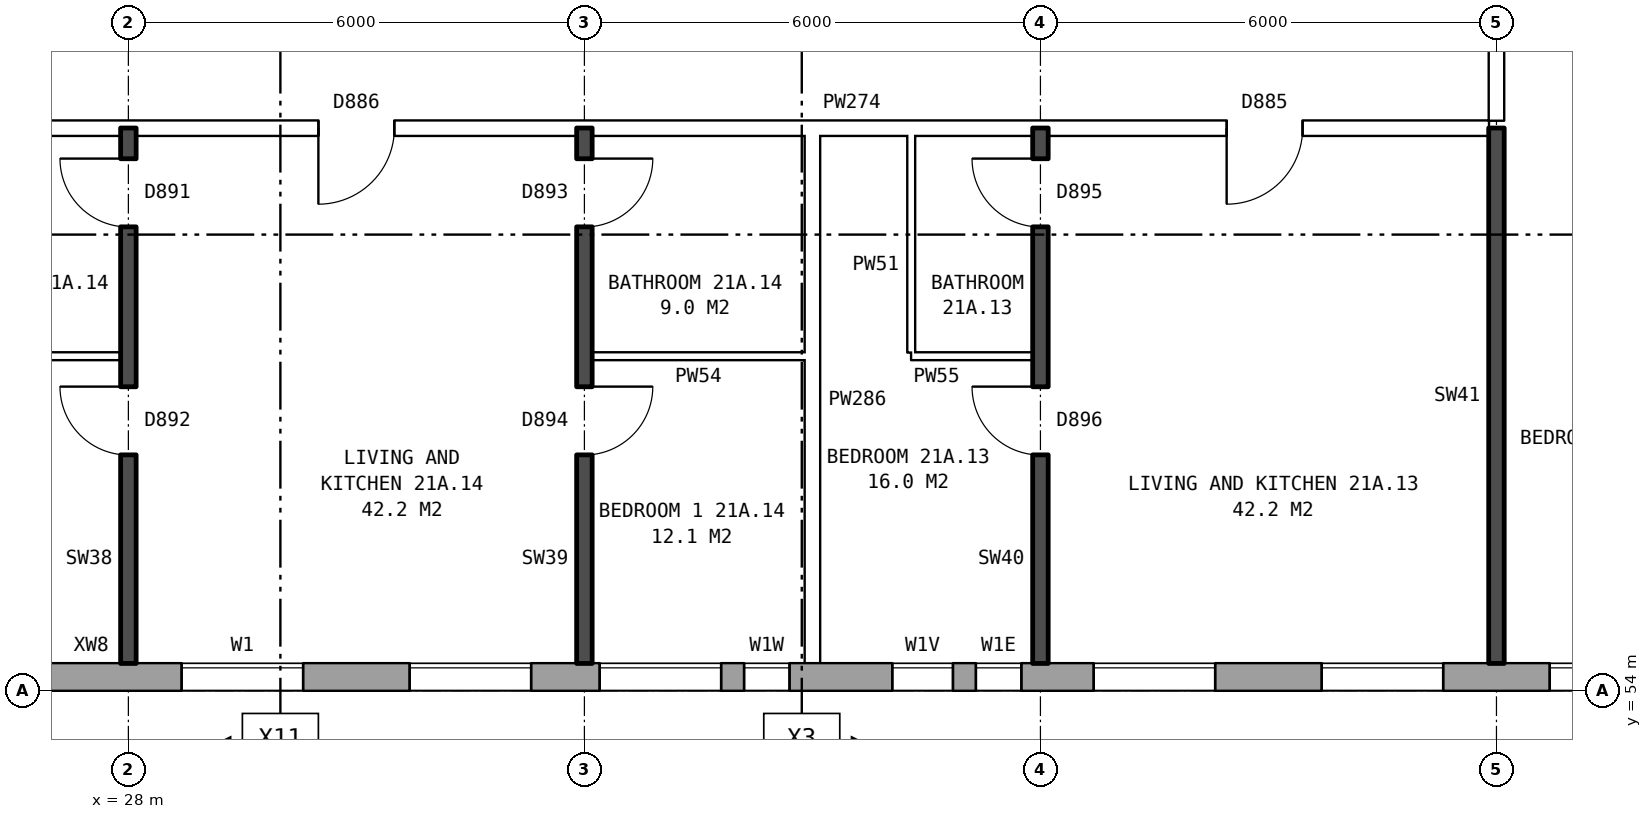
"""IFC4 building model, lengths in metres.
Left out: names, types, materials, properties, quantities, classifications, styles, units other than length and angle.
Written with IfcOpenShell. Run it as: python <this file> out.ifc"""

import sys

from ifc_helpers import new_model, si_unit, direction, frame, frame_2d, origin, place, context, subcontext, project, spatial, rectangle, extrude, element, fill, save


model = new_model("IFC4")
c1 = context("Model", 3, precision=1e-05, world=origin(), true_north=direction((0.0, 1.0)))
c2 = subcontext(c1, "Body", "Model", "MODEL_VIEW")
j1 = project(units=[si_unit("LENGTHUNIT", "METRE"), si_unit("PLANEANGLEUNIT", "RADIAN")], contexts=[c1])
p1 = place(None, origin())
s1 = spatial("IfcSite", under=j1, at=p1, CompositionType="ELEMENT")
p2 = place(p1, origin())
s2 = spatial("IfcBuilding", under=s1, at=p2, CompositionType="ELEMENT")
p3 = place(p2, frame((0.0, 0.0, 77.8)))
s3 = spatial("IfcBuildingStorey", under=s2, at=p3, CompositionType="ELEMENT", Elevation=77.8)
p4 = place(p3, frame((26.325, 54.18, 0.0), z_axis=(0.0, 0.0, 1.0), x_axis=(1.0, 0.0, 0.0)))
e1 = element("IfcWall", 1, at=p4, inside=s3, PredefinedType="STANDARD", context=c2, shape_type="SweptSolid", body=[
    extrude(rectangle(XDim=46.601, YDim=0.36, at=frame_2d((23.3, 0.0))), origin(), (0.0, 0.0, 1.0), 2.85),
])
p5 = place(p4, frame((2.375, 0.0, 0.8)))
e2 = element("IfcOpeningElement", 2, at=p5, cuts=e1, PredefinedType="OPENING", context=c2, shape_type="SweptSolid", body=[
    extrude(rectangle(XDim=1.6, YDim=1.8, at=frame_2d((0.8, 0.9))), frame((0.0, 0.19, 0.0), z_axis=(0.0, -1.0, 0.0), x_axis=(1.0, 0.0, 0.0)), (0.0, 0.0, 1.0), 0.38),
])
p6 = place(p4, frame((5.375, 0.0, 0.8)))
e3 = element("IfcOpeningElement", 3, at=p6, cuts=e1, PredefinedType="OPENING", context=c2, shape_type="SweptSolid", body=[
    extrude(rectangle(XDim=1.6, YDim=1.8, at=frame_2d((0.8, 0.9))), frame((0.0, 0.19, 0.0), z_axis=(0.0, -1.0, 0.0), x_axis=(1.0, 0.0, 0.0)), (0.0, 0.0, 1.0), 0.38),
])
p7 = place(p4, frame((7.875, 0.0, 0.8)))
e4 = element("IfcOpeningElement", 4, at=p7, cuts=e1, PredefinedType="OPENING", context=c2, shape_type="SweptSolid", body=[
    extrude(rectangle(XDim=1.6, YDim=1.8, at=frame_2d((0.8, 0.9))), frame((0.0, 0.19, 0.0), z_axis=(0.0, -1.0, 0.0), x_axis=(1.0, 0.0, 0.0)), (0.0, 0.0, 1.0), 0.38),
])
p8 = place(p4, frame((11.725, 0.0, 0.65)))
e5 = element("IfcOpeningElement", 5, at=p8, cuts=e1, PredefinedType="OPENING", context=c2, shape_type="SweptSolid", body=[
    extrude(rectangle(XDim=0.8, YDim=0.9, at=frame_2d((0.4, 0.45))), frame((0.0, 0.19, 0.0), z_axis=(0.0, -1.0, 0.0), x_axis=(1.0, 0.0, 0.0)), (0.0, 0.0, 1.0), 0.38),
])
p9 = place(p4, frame((14.375, 0.0, 0.8)))
e6 = element("IfcOpeningElement", 6, at=p9, cuts=e1, PredefinedType="OPENING", context=c2, shape_type="SweptSolid", body=[
    extrude(rectangle(XDim=1.6, YDim=1.8, at=frame_2d((0.8, 0.9))), frame((0.0, 0.19, 0.0), z_axis=(0.0, -1.0, 0.0), x_axis=(1.0, 0.0, 0.0)), (0.0, 0.0, 1.0), 0.38),
])
p10 = place(p4, frame((17.375, 0.0, 0.8)))
e7 = element("IfcOpeningElement", 7, at=p10, cuts=e1, PredefinedType="OPENING", context=c2, shape_type="SweptSolid", body=[
    extrude(rectangle(XDim=1.6, YDim=1.8, at=frame_2d((0.8, 0.9))), frame((0.0, 0.19, 0.0), z_axis=(0.0, -1.0, 0.0), x_axis=(1.0, 0.0, 0.0)), (0.0, 0.0, 1.0), 0.38),
])
p11 = place(p4, frame((20.375, 0.0, 0.8)))
e8 = element("IfcOpeningElement", 8, at=p11, cuts=e1, PredefinedType="OPENING", context=c2, shape_type="SweptSolid", body=[
    extrude(rectangle(XDim=1.6, YDim=1.8, at=frame_2d((0.8, 0.9))), frame((0.0, 0.19, 0.0), z_axis=(0.0, -1.0, 0.0), x_axis=(1.0, 0.0, 0.0)), (0.0, 0.0, 1.0), 0.38),
])
p12 = place(p4, frame((23.375, 0.0, 0.8)))
e9 = element("IfcOpeningElement", 9, at=p12, cuts=e1, PredefinedType="OPENING", context=c2, shape_type="SweptSolid", body=[
    extrude(rectangle(XDim=1.6, YDim=1.8, at=frame_2d((0.8, 0.9))), frame((0.0, 0.19, 0.0), z_axis=(0.0, -1.0, 0.0), x_axis=(1.0, 0.0, 0.0)), (0.0, 0.0, 1.0), 0.38),
])
p13 = place(p4, frame((26.375, 0.0, 0.8)))
e10 = element("IfcOpeningElement", 10, at=p13, cuts=e1, PredefinedType="OPENING", context=c2, shape_type="SweptSolid", body=[
    extrude(rectangle(XDim=1.6, YDim=1.8, at=frame_2d((0.8, 0.9))), frame((0.0, 0.19, 0.0), z_axis=(0.0, -1.0, 0.0), x_axis=(1.0, 0.0, 0.0)), (0.0, 0.0, 1.0), 0.38),
])
p14 = place(p4, frame((29.375, 0.0, 0.8)))
e11 = element("IfcOpeningElement", 11, at=p14, cuts=e1, PredefinedType="OPENING", context=c2, shape_type="SweptSolid", body=[
    extrude(rectangle(XDim=1.6, YDim=1.8, at=frame_2d((0.8, 0.9))), frame((0.0, 0.19, 0.0), z_axis=(0.0, -1.0, 0.0), x_axis=(1.0, 0.0, 0.0)), (0.0, 0.0, 1.0), 0.38),
])
p15 = place(p4, frame((32.375, 0.0, 0.8)))
e12 = element("IfcOpeningElement", 12, at=p15, cuts=e1, PredefinedType="OPENING", context=c2, shape_type="SweptSolid", body=[
    extrude(rectangle(XDim=1.6, YDim=1.8, at=frame_2d((0.8, 0.9))), frame((0.0, 0.19, 0.0), z_axis=(0.0, -1.0, 0.0), x_axis=(1.0, 0.0, 0.0)), (0.0, 0.0, 1.0), 0.38),
])
p16 = place(p4, frame((34.825, 0.0, 0.15)))
e13 = element("IfcOpeningElement", 13, at=p16, cuts=e1, PredefinedType="OPENING", context=c2, shape_type="SweptSolid", body=[
    extrude(rectangle(XDim=0.6, YDim=0.9, at=frame_2d((0.3, 0.45))), frame((0.0, 0.19, 0.0), z_axis=(0.0, -1.0, 0.0), x_axis=(1.0, 0.0, 0.0)), (0.0, 0.0, 1.0), 0.38),
])
p17 = place(p4, frame((38.375, 0.0, 0.8)))
e14 = element("IfcOpeningElement", 14, at=p17, cuts=e1, PredefinedType="OPENING", context=c2, shape_type="SweptSolid", body=[
    extrude(rectangle(XDim=1.6, YDim=1.8, at=frame_2d((0.8, 0.9))), frame((0.0, 0.19, 0.0), z_axis=(0.0, -1.0, 0.0), x_axis=(1.0, 0.0, 0.0)), (0.0, 0.0, 1.0), 0.38),
])
p18 = place(p4, frame((41.375, 0.0, 0.8)))
e15 = element("IfcOpeningElement", 15, at=p18, cuts=e1, PredefinedType="OPENING", context=c2, shape_type="SweptSolid", body=[
    extrude(rectangle(XDim=1.6, YDim=1.8, at=frame_2d((0.8, 0.9))), frame((0.0, 0.19, 0.0), z_axis=(0.0, -1.0, 0.0), x_axis=(1.0, 0.0, 0.0)), (0.0, 0.0, 1.0), 0.38),
])
p19 = place(p4, frame((44.375, 0.0, 0.8)))
e16 = element("IfcOpeningElement", 16, at=p19, cuts=e1, PredefinedType="OPENING", context=c2, shape_type="SweptSolid", body=[
    extrude(rectangle(XDim=1.6, YDim=1.8, at=frame_2d((0.8, 0.9))), frame((0.0, 0.19, 0.0), z_axis=(0.0, -1.0, 0.0), x_axis=(1.0, 0.0, 0.0)), (0.0, 0.0, 1.0), 0.38),
])
p20 = place(p4, frame((9.775, 0.0, 1.5)))
e17 = element("IfcOpeningElement", 17, at=p20, cuts=e1, PredefinedType="OPENING", context=c2, shape_type="SweptSolid", body=[
    extrude(rectangle(XDim=0.6, YDim=0.9, at=frame_2d((0.3, 0.45))), frame((0.0, 0.19, 0.0), z_axis=(0.0, -1.0, 0.0), x_axis=(1.0, 0.0, 0.0)), (0.0, 0.0, 1.0), 0.38),
])
p21 = place(p4, frame((12.825, 0.0, 0.65)))
e18 = element("IfcOpeningElement", 18, at=p21, cuts=e1, PredefinedType="OPENING", context=c2, shape_type="SweptSolid", body=[
    extrude(rectangle(XDim=0.6, YDim=1.8, at=frame_2d((0.3, 0.9))), frame((0.0, 0.19, 0.0), z_axis=(0.0, -1.0, 0.0), x_axis=(1.0, 0.0, 0.0)), (0.0, 0.0, 1.0), 0.38),
])
p22 = place(p4, frame((36.025, 0.0, 1.65)))
e19 = element("IfcOpeningElement", 19, at=p22, cuts=e1, PredefinedType="OPENING", context=c2, shape_type="SweptSolid", body=[
    extrude(rectangle(XDim=1.4, YDim=0.9, at=frame_2d((0.7, 0.45))), frame((0.0, 0.19, 0.0), z_axis=(0.0, -1.0, 0.0), x_axis=(1.0, 0.0, 0.0)), (0.0, 0.0, 1.0), 0.38),
])
p23 = place(p3, frame((25.0, 58.4, 0.0), z_axis=(0.0, 0.0, 1.0), x_axis=(1.0, 0.0, 0.0)))
e20 = element("IfcWall", 20, at=p23, inside=s3, PredefinedType="PARTITIONING", context=c2, shape_type="SweptSolid", body=[
    extrude(rectangle(XDim=2.9, YDim=0.1, at=frame_2d((1.45, 0.0))), origin(), (0.0, 0.0, 1.0), 2.85),
])
p24 = place(p3, frame((34.1, 58.4, 0.0), z_axis=(0.0, 0.0, 1.0), x_axis=(1.0, 0.0, 0.0)))
e21 = element("IfcWall", 21, at=p24, inside=s3, PredefinedType="PARTITIONING", context=c2, shape_type="SweptSolid", body=[
    extrude(rectangle(XDim=2.8, YDim=0.1, at=frame_2d((1.4, 0.0))), origin(), (0.0, 0.0, 1.0), 2.85),
])
p25 = place(p3, frame((38.3, 58.4, 0.0), z_axis=(0.0, 0.0, 1.0), x_axis=(1.0, 0.0, 0.0)))
e22 = element("IfcWall", 22, at=p25, inside=s3, PredefinedType="PARTITIONING", context=c2, shape_type="SweptSolid", body=[
    extrude(rectangle(XDim=1.6, YDim=0.1, at=frame_2d((0.8, 0.0))), origin(), (0.0, 0.0, 1.0), 2.85),
])
p26 = place(p3, frame((23.61, 61.4, 0.0), z_axis=(0.0, 0.0, 1.0), x_axis=(1.0, 0.0, 0.0)))
e23 = element("IfcWall", 23, at=p26, inside=s3, PredefinedType="PARTITIONING", context=c2, shape_type="SweptSolid", body=[
    extrude(rectangle(XDim=22.29, YDim=0.2, at=frame_2d((11.145, 0.0))), origin(), (0.0, 0.0, 1.0), 2.85),
])
p27 = place(p26, frame((18.84, 0.0, 0.0)))
e24 = element("IfcOpeningElement", 24, at=p27, cuts=e23, PredefinedType="OPENING", context=c2, shape_type="SweptSolid", body=[
    extrude(rectangle(XDim=1.0, YDim=2.1, at=frame_2d((0.5, 1.05))), frame((0.0, 0.11, 0.0), z_axis=(0.0, -1.0, 0.0), x_axis=(1.0, 0.0, 0.0)), (0.0, 0.0, 1.0), 0.22),
])
p28 = place(p26, frame((6.89, 0.0, 0.0)))
e25 = element("IfcOpeningElement", 25, at=p28, cuts=e23, PredefinedType="OPENING", context=c2, shape_type="SweptSolid", body=[
    extrude(rectangle(XDim=1.0, YDim=2.1, at=frame_2d((0.5, 1.05))), frame((0.0, 0.11, 0.0), z_axis=(0.0, -1.0, 0.0), x_axis=(1.0, 0.0, 0.0)), (0.0, 0.0, 1.0), 0.22),
])
p29 = place(p3, frame((28.0, 54.36, 0.0), z_axis=(0.0, 0.0, 1.0), x_axis=(0.0, 1.0, 0.0)))
e26 = element("IfcWall", 26, at=p29, inside=s3, PredefinedType="SOLIDWALL", context=c2, shape_type="SweptSolid", body=[
    extrude(rectangle(XDim=7.04, YDim=0.2, at=frame_2d((3.52, 0.0))), origin(), (0.0, 0.0, 1.0), 2.85),
])
p30 = place(p29, frame((2.74, 0.0, 0.0)))
e27 = element("IfcOpeningElement", 27, at=p30, cuts=e26, PredefinedType="OPENING", context=c2, shape_type="SweptSolid", body=[
    extrude(rectangle(XDim=0.9, YDim=2.1, at=frame_2d((0.45, 1.05))), frame((0.0, 0.11, 0.0), z_axis=(0.0, -1.0, 0.0), x_axis=(1.0, 0.0, 0.0)), (0.0, 0.0, 1.0), 0.22),
])
p31 = place(p29, frame((5.74, 0.0, 0.0)))
e28 = element("IfcOpeningElement", 28, at=p31, cuts=e26, PredefinedType="OPENING", context=c2, shape_type="SweptSolid", body=[
    extrude(rectangle(XDim=0.9, YDim=2.1, at=frame_2d((0.45, 1.05))), frame((0.0, 0.11, 0.0), z_axis=(0.0, -1.0, 0.0), x_axis=(1.0, 0.0, 0.0)), (0.0, 0.0, 1.0), 0.22),
])
p32 = place(p3, frame((34.0, 54.36, 0.0), z_axis=(0.0, 0.0, 1.0), x_axis=(0.0, 1.0, 0.0)))
e29 = element("IfcWall", 29, at=p32, inside=s3, PredefinedType="SOLIDWALL", context=c2, shape_type="SweptSolid", body=[
    extrude(rectangle(XDim=7.04, YDim=0.2, at=frame_2d((3.52, 0.0))), origin(), (0.0, 0.0, 1.0), 2.85),
])
p33 = place(p32, frame((2.74, 0.0, 0.0)))
e30 = element("IfcOpeningElement", 30, at=p33, cuts=e29, PredefinedType="OPENING", context=c2, shape_type="SweptSolid", body=[
    extrude(rectangle(XDim=0.9, YDim=2.1, at=frame_2d((0.45, 1.05))), frame((0.0, 0.11, 0.0), z_axis=(0.0, -1.0, 0.0), x_axis=(1.0, 0.0, 0.0)), (0.0, 0.0, 1.0), 0.22),
])
p34 = place(p32, frame((5.74, 0.0, 0.0)))
e31 = element("IfcOpeningElement", 31, at=p34, cuts=e29, PredefinedType="OPENING", context=c2, shape_type="SweptSolid", body=[
    extrude(rectangle(XDim=0.9, YDim=2.1, at=frame_2d((0.45, 1.05))), frame((0.0, 0.11, 0.0), z_axis=(0.0, -1.0, 0.0), x_axis=(1.0, 0.0, 0.0)), (0.0, 0.0, 1.0), 0.22),
])
p35 = place(p3, frame((37.0, 54.36, 0.0), z_axis=(0.0, 0.0, 1.0), x_axis=(0.0, 1.0, 0.0)))
e32 = element("IfcWall", 32, at=p35, inside=s3, PredefinedType="PARTITIONING", context=c2, shape_type="SweptSolid", body=[
    extrude(rectangle(XDim=6.94, YDim=0.2, at=frame_2d((3.47, 0.0))), origin(), (0.0, 0.0, 1.0), 2.85),
])
p36 = place(p3, frame((38.3, 58.45, 0.0), z_axis=(0.0, 0.0, 1.0), x_axis=(0.0, 1.0, 0.0)))
e33 = element("IfcWall", 33, at=p36, inside=s3, PredefinedType="PARTITIONING", context=c2, shape_type="SweptSolid", body=[
    extrude(rectangle(XDim=2.85, YDim=0.1, at=frame_2d((1.425, 0.0))), origin(), (0.0, 0.0, 1.0), 2.85),
])
p37 = place(p3, frame((40.0, 54.36, 0.0), z_axis=(0.0, 0.0, 1.0), x_axis=(0.0, 1.0, 0.0)))
e34 = element("IfcWall", 34, at=p37, inside=s3, PredefinedType="SOLIDWALL", context=c2, shape_type="SweptSolid", body=[
    extrude(rectangle(XDim=7.04, YDim=0.2, at=frame_2d((3.52, 0.0))), origin(), (0.0, 0.0, 1.0), 2.85),
])
p38 = place(p37, frame((2.74, 0.0, 0.0)))
e35 = element("IfcOpeningElement", 35, at=p38, cuts=e34, PredefinedType="OPENING", context=c2, shape_type="SweptSolid", body=[
    extrude(rectangle(XDim=0.9, YDim=2.1, at=frame_2d((0.45, 1.05))), frame((0.0, 0.11, 0.0), z_axis=(0.0, -1.0, 0.0), x_axis=(1.0, 0.0, 0.0)), (0.0, 0.0, 1.0), 0.22),
])
p39 = place(p37, frame((5.74, 0.0, 0.0)))
e36 = element("IfcOpeningElement", 36, at=p39, cuts=e34, PredefinedType="OPENING", context=c2, shape_type="SweptSolid", body=[
    extrude(rectangle(XDim=0.9, YDim=2.1, at=frame_2d((0.45, 1.05))), frame((0.0, 0.11, 0.0), z_axis=(0.0, -1.0, 0.0), x_axis=(1.0, 0.0, 0.0)), (0.0, 0.0, 1.0), 0.22),
])
p40 = place(p3, frame((46.0, 54.36, 0.0), z_axis=(0.0, 0.0, 1.0), x_axis=(0.0, 1.0, 0.0)))
e37 = element("IfcWall", 37, at=p40, inside=s3, PredefinedType="SOLIDWALL", context=c2, shape_type="SweptSolid", body=[
    extrude(rectangle(XDim=7.04, YDim=0.2, at=frame_2d((3.52, 0.0))), origin(), (0.0, 0.0, 1.0), 2.85),
])
p41 = place(p3, frame((46.0, 61.5, 0.0), z_axis=(0.0, 0.0, 1.0), x_axis=(0.0, 1.0, 0.0)))
e38 = element("IfcWall", 38, at=p41, inside=s3, PredefinedType="PARTITIONING", context=c2, shape_type="SweptSolid", body=[
    extrude(rectangle(XDim=2.2, YDim=0.2, at=frame_2d((1.1, 0.0))), origin(), (0.0, 0.0, 1.0), 2.85),
])
p42 = place(p5, origin())
e39 = element("IfcWindow", 39, at=p42, inside=s3, PartitioningType="SINGLE_PANEL", PredefinedType="WINDOW", context=c2, shape_type="SweptSolid", body=[
    extrude(rectangle(XDim=1.6, YDim=1.8, at=frame_2d((0.8, 0.9))), frame((0.0, 0.15, 0.0), z_axis=(0.0, -1.0, 0.0), x_axis=(1.0, 0.0, 0.0)), (0.0, 0.0, 1.0), 0.06),
])
fill(e2, e39)
p43 = place(p6, origin())
e40 = element("IfcWindow", 40, at=p43, inside=s3, PartitioningType="SINGLE_PANEL", PredefinedType="WINDOW", context=c2, shape_type="SweptSolid", body=[
    extrude(rectangle(XDim=1.6, YDim=1.8, at=frame_2d((0.8, 0.9))), frame((0.0, 0.15, 0.0), z_axis=(0.0, -1.0, 0.0), x_axis=(1.0, 0.0, 0.0)), (0.0, 0.0, 1.0), 0.06),
])
fill(e3, e40)
p44 = place(p7, origin())
e41 = element("IfcWindow", 41, at=p44, inside=s3, PartitioningType="SINGLE_PANEL", PredefinedType="WINDOW", context=c2, shape_type="SweptSolid", body=[
    extrude(rectangle(XDim=1.6, YDim=1.8, at=frame_2d((0.8, 0.9))), frame((0.0, 0.15, 0.0), z_axis=(0.0, -1.0, 0.0), x_axis=(1.0, 0.0, 0.0)), (0.0, 0.0, 1.0), 0.06),
])
fill(e4, e41)
p45 = place(p8, origin())
e42 = element("IfcWindow", 42, at=p45, inside=s3, PartitioningType="SINGLE_PANEL", PredefinedType="WINDOW", context=c2, shape_type="SweptSolid", body=[
    extrude(rectangle(XDim=0.8, YDim=0.9, at=frame_2d((0.4, 0.45))), frame((0.0, 0.15, 0.0), z_axis=(0.0, -1.0, 0.0), x_axis=(1.0, 0.0, 0.0)), (0.0, 0.0, 1.0), 0.06),
])
fill(e5, e42)
p46 = place(p9, origin())
e43 = element("IfcWindow", 43, at=p46, inside=s3, PartitioningType="SINGLE_PANEL", PredefinedType="WINDOW", context=c2, shape_type="SweptSolid", body=[
    extrude(rectangle(XDim=1.6, YDim=1.8, at=frame_2d((0.8, 0.9))), frame((0.0, 0.15, 0.0), z_axis=(0.0, -1.0, 0.0), x_axis=(1.0, 0.0, 0.0)), (0.0, 0.0, 1.0), 0.06),
])
fill(e6, e43)
p47 = place(p10, origin())
e44 = element("IfcWindow", 44, at=p47, inside=s3, PartitioningType="SINGLE_PANEL", PredefinedType="WINDOW", context=c2, shape_type="SweptSolid", body=[
    extrude(rectangle(XDim=1.6, YDim=1.8, at=frame_2d((0.8, 0.9))), frame((0.0, 0.15, 0.0), z_axis=(0.0, -1.0, 0.0), x_axis=(1.0, 0.0, 0.0)), (0.0, 0.0, 1.0), 0.06),
])
fill(e7, e44)
p48 = place(p11, origin())
e45 = element("IfcWindow", 45, at=p48, inside=s3, PartitioningType="SINGLE_PANEL", PredefinedType="WINDOW", context=c2, shape_type="SweptSolid", body=[
    extrude(rectangle(XDim=1.6, YDim=1.8, at=frame_2d((0.8, 0.9))), frame((0.0, 0.15, 0.0), z_axis=(0.0, -1.0, 0.0), x_axis=(1.0, 0.0, 0.0)), (0.0, 0.0, 1.0), 0.06),
])
fill(e8, e45)
p49 = place(p38, origin())
e46 = element("IfcDoor", 46, at=p49, inside=s3, OperationType="SINGLE_SWING_RIGHT", PredefinedType="DOOR", context=c2, shape_type="SweptSolid", body=[
    extrude(rectangle(XDim=0.9, YDim=2.1, at=frame_2d((0.45, 1.05))), frame((0.0, 0.025, 0.0), z_axis=(0.0, -1.0, 0.0), x_axis=(1.0, 0.0, 0.0)), (0.0, 0.0, 1.0), 0.05),
])
fill(e35, e46)
p50 = place(p27, frame((1.0, 0.0, 0.0), z_axis=(0.0, 0.0, 1.0), x_axis=(-1.0, 0.0, 0.0)))
e47 = element("IfcDoor", 47, at=p50, inside=s3, OperationType="SINGLE_SWING_RIGHT", PredefinedType="DOOR", context=c2, shape_type="SweptSolid", body=[
    extrude(rectangle(XDim=1.0, YDim=2.1, at=frame_2d((0.5, 1.05))), frame((0.0, 0.025, 0.0), z_axis=(0.0, -1.0, 0.0), x_axis=(1.0, 0.0, 0.0)), (0.0, 0.0, 1.0), 0.05),
])
fill(e24, e47)
p51 = place(p39, origin())
e48 = element("IfcDoor", 48, at=p51, inside=s3, OperationType="SINGLE_SWING_RIGHT", PredefinedType="DOOR", context=c2, shape_type="SweptSolid", body=[
    extrude(rectangle(XDim=0.9, YDim=2.1, at=frame_2d((0.45, 1.05))), frame((0.0, 0.025, 0.0), z_axis=(0.0, -1.0, 0.0), x_axis=(1.0, 0.0, 0.0)), (0.0, 0.0, 1.0), 0.05),
])
fill(e36, e48)
p52 = place(p33, frame((0.9, 0.0, 0.0), z_axis=(0.0, 0.0, 1.0), x_axis=(-1.0, 0.0, 0.0)))
e49 = element("IfcDoor", 49, at=p52, inside=s3, OperationType="SINGLE_SWING_LEFT", PredefinedType="DOOR", context=c2, shape_type="SweptSolid", body=[
    extrude(rectangle(XDim=0.9, YDim=2.1, at=frame_2d((0.45, 1.05))), frame((0.0, 0.025, 0.0), z_axis=(0.0, -1.0, 0.0), x_axis=(1.0, 0.0, 0.0)), (0.0, 0.0, 1.0), 0.05),
])
fill(e30, e49)
p53 = place(p30, origin())
e50 = element("IfcDoor", 50, at=p53, inside=s3, OperationType="SINGLE_SWING_RIGHT", PredefinedType="DOOR", context=c2, shape_type="SweptSolid", body=[
    extrude(rectangle(XDim=0.9, YDim=2.1, at=frame_2d((0.45, 1.05))), frame((0.0, 0.025, 0.0), z_axis=(0.0, -1.0, 0.0), x_axis=(1.0, 0.0, 0.0)), (0.0, 0.0, 1.0), 0.05),
])
fill(e27, e50)
p54 = place(p28, frame((1.0, 0.0, 0.0), z_axis=(0.0, 0.0, 1.0), x_axis=(-1.0, 0.0, 0.0)))
e51 = element("IfcDoor", 51, at=p54, inside=s3, OperationType="SINGLE_SWING_RIGHT", PredefinedType="DOOR", context=c2, shape_type="SweptSolid", body=[
    extrude(rectangle(XDim=1.0, YDim=2.1, at=frame_2d((0.5, 1.05))), frame((0.0, 0.025, 0.0), z_axis=(0.0, -1.0, 0.0), x_axis=(1.0, 0.0, 0.0)), (0.0, 0.0, 1.0), 0.05),
])
fill(e25, e51)
p55 = place(p34, frame((0.9, 0.0, 0.0), z_axis=(0.0, 0.0, 1.0), x_axis=(-1.0, 0.0, 0.0)))
e52 = element("IfcDoor", 52, at=p55, inside=s3, OperationType="SINGLE_SWING_LEFT", PredefinedType="DOOR", context=c2, shape_type="SweptSolid", body=[
    extrude(rectangle(XDim=0.9, YDim=2.1, at=frame_2d((0.45, 1.05))), frame((0.0, 0.025, 0.0), z_axis=(0.0, -1.0, 0.0), x_axis=(1.0, 0.0, 0.0)), (0.0, 0.0, 1.0), 0.05),
])
fill(e31, e52)
p56 = place(p31, origin())
e53 = element("IfcDoor", 53, at=p56, inside=s3, OperationType="SINGLE_SWING_RIGHT", PredefinedType="DOOR", context=c2, shape_type="SweptSolid", body=[
    extrude(rectangle(XDim=0.9, YDim=2.1, at=frame_2d((0.45, 1.05))), frame((0.0, 0.025, 0.0), z_axis=(0.0, -1.0, 0.0), x_axis=(1.0, 0.0, 0.0)), (0.0, 0.0, 1.0), 0.05),
])
fill(e28, e53)
p57 = place(p20, origin())
e54 = element("IfcWindow", 54, at=p57, inside=s3, PartitioningType="SINGLE_PANEL", PredefinedType="WINDOW", context=c2, shape_type="SweptSolid", body=[
    extrude(rectangle(XDim=0.6, YDim=0.9, at=frame_2d((0.3, 0.45))), frame((0.0, 0.15, 0.0), z_axis=(0.0, -1.0, 0.0), x_axis=(1.0, 0.0, 0.0)), (0.0, 0.0, 1.0), 0.06),
])
fill(e17, e54)
p58 = place(p21, origin())
e55 = element("IfcWindow", 55, at=p58, inside=s3, PartitioningType="SINGLE_PANEL", PredefinedType="WINDOW", context=c2, shape_type="SweptSolid", body=[
    extrude(rectangle(XDim=0.6, YDim=1.8, at=frame_2d((0.3, 0.9))), frame((0.0, 0.15, 0.0), z_axis=(0.0, -1.0, 0.0), x_axis=(1.0, 0.0, 0.0)), (0.0, 0.0, 1.0), 0.06),
])
fill(e18, e55)
save(model, sys.argv[1])
